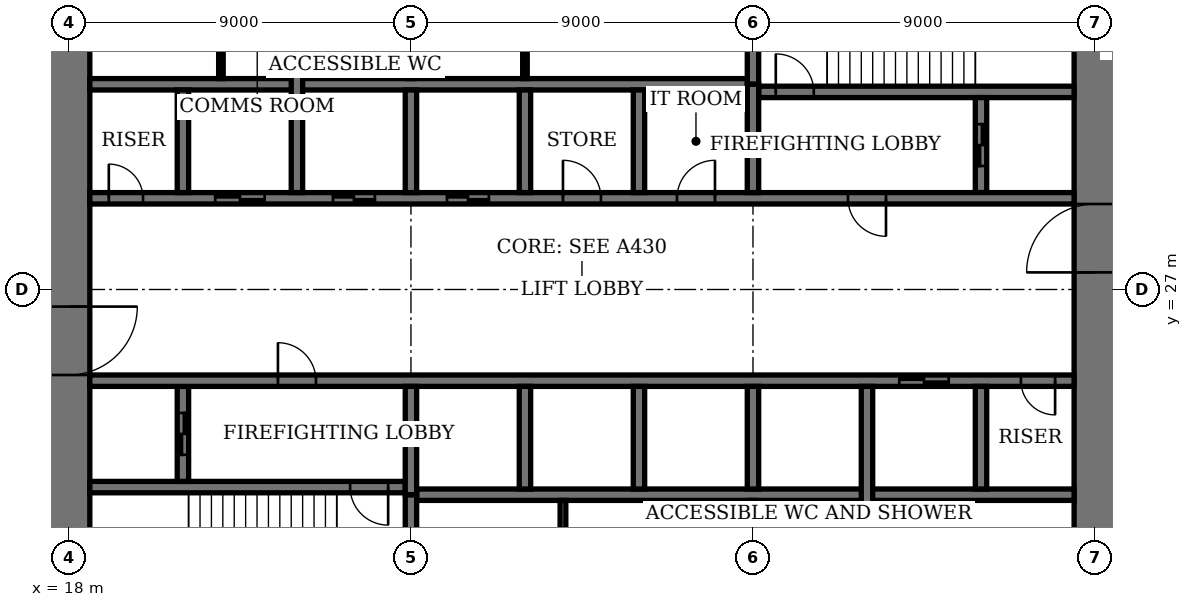
"""IFC4 building model, lengths in metres.
Left out: names, types, materials, properties, quantities, classifications, styles, units other than length and angle.
Written with IfcOpenShell. Run it as: python <this file> out.ifc"""

import sys

from ifc_helpers import new_model, si_unit, direction, frame, frame_2d, origin, place, context, subcontext, project, spatial, rectangle, extrude, element, fill, save


model = new_model("IFC4")
c1 = context("Model", 3, precision=1e-05, world=origin(), true_north=direction((0.0, 1.0)))
c2 = subcontext(c1, "Body", "Model", "MODEL_VIEW")
j1 = project(units=[si_unit("LENGTHUNIT", "METRE"), si_unit("PLANEANGLEUNIT", "RADIAN")], contexts=[c1])
p1 = place(None, origin())
s1 = spatial("IfcSite", under=j1, at=p1, CompositionType="ELEMENT")
p2 = place(p1, origin())
s2 = spatial("IfcBuilding", under=s1, at=p2, CompositionType="ELEMENT")
p3 = place(p2, frame((0.0, 0.0, 162.2)))
s3 = spatial("IfcBuildingStorey", under=s2, at=p3, CompositionType="ELEMENT", Elevation=162.2)
p4 = place(p3, frame((18.0, 35.45, 0.0), z_axis=(0.0, 0.0, 1.0), x_axis=(0.0, -1.0, 0.0)))
e1 = element("IfcWall", 1, at=p4, inside=s3, PredefinedType="SHEAR", context=c2, shape_type="SweptSolid", body=[
    extrude(rectangle(XDim=16.9, YDim=1.1, at=frame_2d((8.45, 0.0))), origin(), (0.0, 0.0, 1.0), 4.0),
])
p5 = place(p4, frame((8.9, 0.0, 0.0)))
e2 = element("IfcOpeningElement", 2, at=p5, cuts=e1, PredefinedType="OPENING", context=c2, shape_type="SweptSolid", body=[
    extrude(rectangle(XDim=1.8, YDim=2.4, at=frame_2d((0.9, 1.2))), frame((0.0, 0.56, 0.0), z_axis=(0.0, -1.0, 0.0), x_axis=(1.0, 0.0, 0.0)), (0.0, 0.0, 1.0), 1.12),
])
p6 = place(p3, frame((45.0, 18.55, 0.0), z_axis=(0.0, 0.0, 1.0), x_axis=(0.0, 1.0, 0.0)))
e3 = element("IfcWall", 3, at=p6, inside=s3, PredefinedType="SHEAR", context=c2, shape_type="SweptSolid", body=[
    extrude(rectangle(XDim=16.9, YDim=1.1, at=frame_2d((8.45, 0.0))), origin(), (0.0, 0.0, 1.0), 4.0),
])
p7 = place(p6, frame((8.9, 0.0, 0.0)))
e4 = element("IfcOpeningElement", 4, at=p7, cuts=e3, PredefinedType="OPENING", context=c2, shape_type="SweptSolid", body=[
    extrude(rectangle(XDim=1.8, YDim=2.4, at=frame_2d((0.9, 1.2))), frame((0.0, 0.56, 0.0), z_axis=(0.0, -1.0, 0.0), x_axis=(1.0, 0.0, 0.0)), (0.0, 0.0, 1.0), 1.12),
])
p8 = place(p3, frame((18.55, 21.8, 0.0), z_axis=(0.0, 0.0, 1.0), x_axis=(1.0, 0.0, 0.0)))
e5 = element("IfcWall", 5, at=p8, inside=s3, PredefinedType="SHEAR", context=c2, shape_type="SweptSolid", body=[
    extrude(rectangle(XDim=8.3, YDim=0.3, at=frame_2d((4.15, 0.0))), origin(), (0.0, 0.0, 1.0), 4.0),
])
p9 = place(p8, frame((6.85, 0.0, 0.0)))
e6 = element("IfcOpeningElement", 6, at=p9, cuts=e5, PredefinedType="OPENING", context=c2, shape_type="SweptSolid", body=[
    extrude(rectangle(XDim=1.0, YDim=2.4, at=frame_2d((0.5, 1.2))), frame((0.0, 0.16, 0.0), z_axis=(0.0, -1.0, 0.0), x_axis=(1.0, 0.0, 0.0)), (0.0, 0.0, 1.0), 0.32),
])
p10 = place(p3, frame((36.15, 32.2, 0.0), z_axis=(0.0, 0.0, 1.0), x_axis=(1.0, 0.0, 0.0)))
e7 = element("IfcWall", 7, at=p10, inside=s3, PredefinedType="SHEAR", context=c2, shape_type="SweptSolid", body=[
    extrude(rectangle(XDim=8.3, YDim=0.3, at=frame_2d((4.15, 0.0))), origin(), (0.0, 0.0, 1.0), 4.0),
])
p11 = place(p10, frame((0.45, 0.0, 0.0)))
e8 = element("IfcOpeningElement", 8, at=p11, cuts=e7, PredefinedType="OPENING", context=c2, shape_type="SweptSolid", body=[
    extrude(rectangle(XDim=1.0, YDim=2.4, at=frame_2d((0.5, 1.2))), frame((0.0, 0.16, 0.0), z_axis=(0.0, -1.0, 0.0), x_axis=(1.0, 0.0, 0.0)), (0.0, 0.0, 1.0), 0.32),
])
for number, where, z_axis, x_axis in (
    (9, (27.0, 18.55, 0.0), (0.0, 0.0, 1.0), (0.0, 1.0, 0.0)),
    (10, (36.0, 32.4, 0.0), (0.0, 0.0, 1.0), (0.0, 1.0, 0.0)),
):
    element("IfcWall", number, at=place(p3, frame(where, z_axis=z_axis, x_axis=x_axis)), inside=s3, PredefinedType="SHEAR", context=c2, shape_type="SweptSolid", body=[
        extrude(rectangle(XDim=3.05, YDim=0.3, at=frame_2d((1.525, 0.0))), origin(), (0.0, 0.0, 1.0), 4.0),
    ])
p12 = place(p3, frame((21.0, 21.95, 0.0), z_axis=(0.0, 0.0, 1.0), x_axis=(0.0, 1.0, 0.0)))
e11 = element("IfcWall", 11, at=p12, inside=s3, PredefinedType="SHEAR", context=c2, shape_type="SweptSolid", body=[
    extrude(rectangle(XDim=2.5, YDim=0.3, at=frame_2d((1.25, 0.0))), origin(), (0.0, 0.0, 1.0), 4.0),
])
p13 = place(p12, frame((0.7, 0.0, 0.0)))
e12 = element("IfcOpeningElement", 12, at=p13, cuts=e11, PredefinedType="OPENING", context=c2, shape_type="SweptSolid", body=[
    extrude(rectangle(XDim=1.1, YDim=2.4, at=frame_2d((0.55, 1.2))), frame((0.0, 0.16, 0.0), z_axis=(0.0, -1.0, 0.0), x_axis=(1.0, 0.0, 0.0)), (0.0, 0.0, 1.0), 0.32),
])
p14 = place(p3, frame((42.0, 29.55, 0.0), z_axis=(0.0, 0.0, 1.0), x_axis=(0.0, 1.0, 0.0)))
e13 = element("IfcWall", 13, at=p14, inside=s3, PredefinedType="SHEAR", context=c2, shape_type="SweptSolid", body=[
    extrude(rectangle(XDim=2.5, YDim=0.3, at=frame_2d((1.25, 0.0))), origin(), (0.0, 0.0, 1.0), 4.0),
])
p15 = place(p14, frame((0.7, 0.0, 0.0)))
e14 = element("IfcOpeningElement", 14, at=p15, cuts=e13, PredefinedType="OPENING", context=c2, shape_type="SweptSolid", body=[
    extrude(rectangle(XDim=1.1, YDim=2.4, at=frame_2d((0.55, 1.2))), frame((0.0, 0.16, 0.0), z_axis=(0.0, -1.0, 0.0), x_axis=(1.0, 0.0, 0.0)), (0.0, 0.0, 1.0), 0.32),
])
p16 = place(p3, frame((18.55, 24.6, 0.0), z_axis=(0.0, 0.0, 1.0), x_axis=(1.0, 0.0, 0.0)))
e15 = element("IfcWall", 15, at=p16, inside=s3, PredefinedType="SHEAR", context=c2, shape_type="SweptSolid", body=[
    extrude(rectangle(XDim=25.9, YDim=0.3, at=frame_2d((12.95, 0.0))), origin(), (0.0, 0.0, 1.0), 4.0),
])
p17 = place(p16, frame((4.95, 0.0, 0.0)))
e16 = element("IfcOpeningElement", 16, at=p17, cuts=e15, PredefinedType="OPENING", context=c2, shape_type="SweptSolid", body=[
    extrude(rectangle(XDim=1.0, YDim=2.4, at=frame_2d((0.5, 1.2))), frame((0.0, 0.16, 0.0), z_axis=(0.0, -1.0, 0.0), x_axis=(1.0, 0.0, 0.0)), (0.0, 0.0, 1.0), 0.32),
])
p18 = place(p16, frame((24.5, 0.0, 0.0)))
e17 = element("IfcOpeningElement", 17, at=p18, cuts=e15, PredefinedType="OPENING", context=c2, shape_type="SweptSolid", body=[
    extrude(rectangle(XDim=0.9, YDim=2.1, at=frame_2d((0.45, 1.05))), frame((0.0, 0.16, 0.0), z_axis=(0.0, -1.0, 0.0), x_axis=(1.0, 0.0, 0.0)), (0.0, 0.0, 1.0), 0.32),
])
p19 = place(p16, frame((21.3, 0.0, 0.0)))
e18 = element("IfcOpeningElement", 18, at=p19, cuts=e15, PredefinedType="OPENING", context=c2, shape_type="SweptSolid", body=[
    extrude(rectangle(XDim=1.3, YDim=2.4, at=frame_2d((0.65, 1.2))), frame((0.0, 0.16, 0.0), z_axis=(0.0, -1.0, 0.0), x_axis=(1.0, 0.0, 0.0)), (0.0, 0.0, 1.0), 0.32),
])
p20 = place(p3, frame((18.55, 29.4, 0.0), z_axis=(0.0, 0.0, 1.0), x_axis=(1.0, 0.0, 0.0)))
e19 = element("IfcWall", 19, at=p20, inside=s3, PredefinedType="SHEAR", context=c2, shape_type="SweptSolid", body=[
    extrude(rectangle(XDim=25.9, YDim=0.3, at=frame_2d((12.95, 0.0))), origin(), (0.0, 0.0, 1.0), 4.0),
])
p21 = place(p20, frame((19.95, 0.0, 0.0)))
e20 = element("IfcOpeningElement", 20, at=p21, cuts=e19, PredefinedType="OPENING", context=c2, shape_type="SweptSolid", body=[
    extrude(rectangle(XDim=1.0, YDim=2.4, at=frame_2d((0.5, 1.2))), frame((0.0, 0.16, 0.0), z_axis=(0.0, -1.0, 0.0), x_axis=(1.0, 0.0, 0.0)), (0.0, 0.0, 1.0), 0.32),
])
p22 = place(p20, frame((0.5, 0.0, 0.0)))
e21 = element("IfcOpeningElement", 21, at=p22, cuts=e19, PredefinedType="OPENING", context=c2, shape_type="SweptSolid", body=[
    extrude(rectangle(XDim=0.9, YDim=2.1, at=frame_2d((0.45, 1.05))), frame((0.0, 0.16, 0.0), z_axis=(0.0, -1.0, 0.0), x_axis=(1.0, 0.0, 0.0)), (0.0, 0.0, 1.0), 0.32),
])
p23 = place(p20, frame((15.45, 0.0, 0.0)))
e22 = element("IfcOpeningElement", 22, at=p23, cuts=e19, PredefinedType="OPENING", context=c2, shape_type="SweptSolid", body=[
    extrude(rectangle(XDim=1.0, YDim=2.4, at=frame_2d((0.5, 1.2))), frame((0.0, 0.16, 0.0), z_axis=(0.0, -1.0, 0.0), x_axis=(1.0, 0.0, 0.0)), (0.0, 0.0, 1.0), 0.32),
])
p24 = place(p20, frame((12.45, 0.0, 0.0)))
e23 = element("IfcOpeningElement", 23, at=p24, cuts=e19, PredefinedType="OPENING", context=c2, shape_type="SweptSolid", body=[
    extrude(rectangle(XDim=1.0, YDim=2.4, at=frame_2d((0.5, 1.2))), frame((0.0, 0.16, 0.0), z_axis=(0.0, -1.0, 0.0), x_axis=(1.0, 0.0, 0.0)), (0.0, 0.0, 1.0), 0.32),
])
p25 = place(p20, frame((9.4, 0.0, 0.0)))
e24 = element("IfcOpeningElement", 24, at=p25, cuts=e19, PredefinedType="OPENING", context=c2, shape_type="SweptSolid", body=[
    extrude(rectangle(XDim=1.1, YDim=2.4, at=frame_2d((0.55, 1.2))), frame((0.0, 0.16, 0.0), z_axis=(0.0, -1.0, 0.0), x_axis=(1.0, 0.0, 0.0)), (0.0, 0.0, 1.0), 0.32),
])
p26 = place(p20, frame((6.4, 0.0, 0.0)))
e25 = element("IfcOpeningElement", 25, at=p26, cuts=e19, PredefinedType="OPENING", context=c2, shape_type="SweptSolid", body=[
    extrude(rectangle(XDim=1.1, YDim=2.4, at=frame_2d((0.55, 1.2))), frame((0.0, 0.16, 0.0), z_axis=(0.0, -1.0, 0.0), x_axis=(1.0, 0.0, 0.0)), (0.0, 0.0, 1.0), 0.32),
])
p27 = place(p20, frame((3.3, 0.0, 0.0)))
e26 = element("IfcOpeningElement", 26, at=p27, cuts=e19, PredefinedType="OPENING", context=c2, shape_type="SweptSolid", body=[
    extrude(rectangle(XDim=1.3, YDim=2.4, at=frame_2d((0.65, 1.2))), frame((0.0, 0.16, 0.0), z_axis=(0.0, -1.0, 0.0), x_axis=(1.0, 0.0, 0.0)), (0.0, 0.0, 1.0), 0.32),
])
for number, where, z_axis, x_axis in (
    (27, (27.15, 21.6, 0.0), (0.0, 0.0, 1.0), (1.0, 0.0, 0.0)),
    (28, (18.55, 32.4, 0.0), (0.0, 0.0, 1.0), (1.0, 0.0, 0.0)),
):
    element("IfcWall", number, at=place(p3, frame(where, z_axis=z_axis, x_axis=x_axis)), inside=s3, PredefinedType="SHEAR", context=c2, shape_type="SweptSolid", body=[
        extrude(rectangle(XDim=17.3, YDim=0.3, at=frame_2d((8.65, 0.0))), origin(), (0.0, 0.0, 1.0), 4.0),
    ])
for number, where, z_axis, x_axis in (
    (29, (30.0, 21.75, 0.0), (0.0, 0.0, 1.0), (0.0, 1.0, 0.0)),
    (30, (33.0, 29.55, 0.0), (0.0, 0.0, 1.0), (0.0, 1.0, 0.0)),
    (31, (33.0, 21.75, 0.0), (0.0, 0.0, 1.0), (0.0, 1.0, 0.0)),
    (32, (30.0, 29.55, 0.0), (0.0, 0.0, 1.0), (0.0, 1.0, 0.0)),
    (33, (36.0, 21.75, 0.0), (0.0, 0.0, 1.0), (0.0, 1.0, 0.0)),
    (34, (27.0, 29.55, 0.0), (0.0, 0.0, 1.0), (0.0, 1.0, 0.0)),
):
    element("IfcWall", number, at=place(p3, frame(where, z_axis=z_axis, x_axis=x_axis)), inside=s3, PredefinedType="SHEAR", context=c2, shape_type="SweptSolid", body=[
        extrude(rectangle(XDim=2.7, YDim=0.3, at=frame_2d((1.35, 0.0))), origin(), (0.0, 0.0, 1.0), 4.0),
    ])
for number, where, z_axis, x_axis in (
    (35, (39.0, 18.55, 0.0), (0.0, 0.0, 1.0), (0.0, 1.0, 0.0)),
    (36, (24.0, 29.55, 0.0), (0.0, 0.0, 1.0), (0.0, 1.0, 0.0)),
):
    element("IfcWall", number, at=place(p3, frame(where, z_axis=z_axis, x_axis=x_axis)), inside=s3, PredefinedType="SHEAR", context=c2, shape_type="SweptSolid", body=[
        extrude(rectangle(XDim=5.9, YDim=0.3, at=frame_2d((2.95, 0.0))), origin(), (0.0, 0.0, 1.0), 4.0),
    ])
for number, where, z_axis, x_axis in (
    (37, (42.0, 21.75, 0.0), (0.0, 0.0, 1.0), (0.0, 1.0, 0.0)),
    (38, (21.0, 29.55, 0.0), (0.0, 0.0, 1.0), (0.0, 1.0, 0.0)),
):
    element("IfcWall", number, at=place(p3, frame(where, z_axis=z_axis, x_axis=x_axis)), inside=s3, PredefinedType="SHEAR", context=c2, shape_type="SweptSolid", body=[
        extrude(rectangle(XDim=2.7, YDim=0.3, at=frame_2d((1.35, 0.0))), origin(), (0.0, 0.0, 1.0), 4.0),
    ])
for number, where, z_axis, x_axis in (
    (39, (27.0, 21.6, 0.0), (0.0, 0.0, 1.0), (0.0, 1.0, 0.0)),
    (40, (36.0, 29.55, 0.0), (0.0, 0.0, 1.0), (0.0, 1.0, 0.0)),
):
    element("IfcWall", number, at=place(p3, frame(where, z_axis=z_axis, x_axis=x_axis)), inside=s3, PredefinedType="SHEAR", context=c2, shape_type="SweptSolid", body=[
        extrude(rectangle(XDim=2.85, YDim=0.3, at=frame_2d((1.425, 0.0))), origin(), (0.0, 0.0, 1.0), 4.0),
    ])
for number, where, z_axis, x_axis in (
    (41, (31.0, 18.55, 0.0), (0.0, 0.0, 1.0), (0.0, 1.0, 0.0)),
    (42, (36.0, 18.55, 0.0), (0.0, 0.0, 1.0), (0.0, 1.0, 0.0)),
):
    element("IfcWall", number, at=place(p3, frame(where, z_axis=z_axis, x_axis=x_axis)), inside=s3, PredefinedType="PARTITIONING", context=c2, shape_type="SweptSolid", body=[
        extrude(rectangle(XDim=2.9, YDim=0.15, at=frame_2d((1.45, 0.0))), origin(), (0.0, 0.0, 1.0), 3.75),
    ])
p28 = place(p3, frame((30.0, 32.55, 0.0), z_axis=(0.0, 0.0, 1.0), x_axis=(0.0, 1.0, 0.0)))
e43 = element("IfcWall", 43, at=p28, inside=s3, PredefinedType="PARTITIONING", context=c2, shape_type="SweptSolid", body=[
    extrude(rectangle(XDim=2.9, YDim=0.12, at=frame_2d((1.45, 0.0))), origin(), (0.0, 0.0, 1.0), 3.75),
])
p29 = place(p3, frame((27.0, 32.55, 0.0), z_axis=(0.0, 0.0, 1.0), x_axis=(0.0, 1.0, 0.0)))
e44 = element("IfcWall", 44, at=p29, inside=s3, PredefinedType="PARTITIONING", context=c2, shape_type="SweptSolid", body=[
    extrude(rectangle(XDim=2.9, YDim=0.15, at=frame_2d((1.45, 0.0))), origin(), (0.0, 0.0, 1.0), 3.75),
])
p30 = place(p3, frame((22.0, 32.55, 0.0), z_axis=(0.0, 0.0, 1.0), x_axis=(0.0, 1.0, 0.0)))
e45 = element("IfcWall", 45, at=p30, inside=s3, PredefinedType="PARTITIONING", context=c2, shape_type="SweptSolid", body=[
    extrude(rectangle(XDim=2.9, YDim=0.12, at=frame_2d((1.45, 0.0))), origin(), (0.0, 0.0, 1.0), 3.75),
])
p31 = place(p30, frame((0.95, 0.0, 0.0)))
e46 = element("IfcOpeningElement", 46, at=p31, cuts=e45, PredefinedType="OPENING", context=c2, shape_type="SweptSolid", body=[
    extrude(rectangle(XDim=1.0, YDim=2.4, at=frame_2d((0.5, 1.2))), frame((0.0, 0.07, 0.0), z_axis=(0.0, -1.0, 0.0), x_axis=(1.0, 0.0, 0.0)), (0.0, 0.0, 1.0), 0.14),
])
p32 = place(p5, origin())
e47 = element("IfcDoor", 47, at=p32, inside=s3, OperationType="DOUBLE_DOOR_DOUBLE_SWING", PredefinedType="DOOR", context=c2, shape_type="SweptSolid", body=[
    extrude(rectangle(XDim=1.8, YDim=2.4, at=frame_2d((0.9, 1.2))), frame((0.0, 0.03, 0.0), z_axis=(0.0, -1.0, 0.0), x_axis=(1.0, 0.0, 0.0)), (0.0, 0.0, 1.0), 0.06),
    extrude(rectangle(XDim=0.04, YDim=2.4, at=frame_2d((0.02, 1.2))), frame((0.0, 0.55, 0.0), z_axis=(0.0, -1.0, 0.0), x_axis=(1.0, 0.0, 0.0)), (0.0, 0.0, 1.0), 1.1),
    extrude(rectangle(XDim=0.04, YDim=2.4, at=frame_2d((1.78, 1.2))), frame((0.0, 0.55, 0.0), z_axis=(0.0, -1.0, 0.0), x_axis=(1.0, 0.0, 0.0)), (0.0, 0.0, 1.0), 1.1),
    extrude(rectangle(XDim=1.8, YDim=0.04, at=frame_2d((0.9, 2.38))), frame((0.0, 0.55, 0.0), z_axis=(0.0, -1.0, 0.0), x_axis=(1.0, 0.0, 0.0)), (0.0, 0.0, 1.0), 1.1),
])
fill(e2, e47)
p33 = place(p7, origin())
e48 = element("IfcDoor", 48, at=p33, inside=s3, OperationType="DOUBLE_DOOR_DOUBLE_SWING", PredefinedType="DOOR", context=c2, shape_type="SweptSolid", body=[
    extrude(rectangle(XDim=1.8, YDim=2.4, at=frame_2d((0.9, 1.2))), frame((0.0, 0.03, 0.0), z_axis=(0.0, -1.0, 0.0), x_axis=(1.0, 0.0, 0.0)), (0.0, 0.0, 1.0), 0.06),
    extrude(rectangle(XDim=0.04, YDim=2.4, at=frame_2d((0.02, 1.2))), frame((0.0, 0.55, 0.0), z_axis=(0.0, -1.0, 0.0), x_axis=(1.0, 0.0, 0.0)), (0.0, 0.0, 1.0), 1.1),
    extrude(rectangle(XDim=0.04, YDim=2.4, at=frame_2d((1.78, 1.2))), frame((0.0, 0.55, 0.0), z_axis=(0.0, -1.0, 0.0), x_axis=(1.0, 0.0, 0.0)), (0.0, 0.0, 1.0), 1.1),
    extrude(rectangle(XDim=1.8, YDim=0.04, at=frame_2d((0.9, 2.38))), frame((0.0, 0.55, 0.0), z_axis=(0.0, -1.0, 0.0), x_axis=(1.0, 0.0, 0.0)), (0.0, 0.0, 1.0), 1.1),
])
fill(e4, e48)
p34 = place(p9, origin())
e49 = element("IfcDoor", 49, at=p34, inside=s3, OperationType="SINGLE_SWING_RIGHT", PredefinedType="DOOR", context=c2, shape_type="SweptSolid", body=[
    extrude(rectangle(XDim=1.0, YDim=2.4, at=frame_2d((0.5, 1.2))), frame((0.0, 0.03, 0.0), z_axis=(0.0, -1.0, 0.0), x_axis=(1.0, 0.0, 0.0)), (0.0, 0.0, 1.0), 0.06),
])
fill(e6, e49)
p35 = place(p11, origin())
e50 = element("IfcDoor", 50, at=p35, inside=s3, OperationType="SINGLE_SWING_RIGHT", PredefinedType="DOOR", context=c2, shape_type="SweptSolid", body=[
    extrude(rectangle(XDim=1.0, YDim=2.4, at=frame_2d((0.5, 1.2))), frame((0.0, 0.03, 0.0), z_axis=(0.0, -1.0, 0.0), x_axis=(1.0, 0.0, 0.0)), (0.0, 0.0, 1.0), 0.06),
])
fill(e8, e50)
p36 = place(p17, origin())
e51 = element("IfcDoor", 51, at=p36, inside=s3, OperationType="SINGLE_SWING_RIGHT", PredefinedType="DOOR", context=c2, shape_type="SweptSolid", body=[
    extrude(rectangle(XDim=1.0, YDim=2.4, at=frame_2d((0.5, 1.2))), frame((0.0, 0.03, 0.0), z_axis=(0.0, -1.0, 0.0), x_axis=(1.0, 0.0, 0.0)), (0.0, 0.0, 1.0), 0.06),
])
fill(e16, e51)
p37 = place(p21, origin())
e52 = element("IfcDoor", 52, at=p37, inside=s3, OperationType="SINGLE_SWING_RIGHT", PredefinedType="DOOR", context=c2, shape_type="SweptSolid", body=[
    extrude(rectangle(XDim=1.0, YDim=2.4, at=frame_2d((0.5, 1.2))), frame((0.0, 0.03, 0.0), z_axis=(0.0, -1.0, 0.0), x_axis=(1.0, 0.0, 0.0)), (0.0, 0.0, 1.0), 0.06),
])
fill(e20, e52)
p38 = place(p18, origin())
e53 = element("IfcDoor", 53, at=p38, inside=s3, OperationType="SINGLE_SWING_RIGHT", PredefinedType="DOOR", context=c2, shape_type="SweptSolid", body=[
    extrude(rectangle(XDim=0.9, YDim=2.1, at=frame_2d((0.45, 1.05))), frame((0.0, 0.03, 0.0), z_axis=(0.0, -1.0, 0.0), x_axis=(1.0, 0.0, 0.0)), (0.0, 0.0, 1.0), 0.06),
])
fill(e17, e53)
p39 = place(p22, origin())
e54 = element("IfcDoor", 54, at=p39, inside=s3, OperationType="SINGLE_SWING_RIGHT", PredefinedType="DOOR", context=c2, shape_type="SweptSolid", body=[
    extrude(rectangle(XDim=0.9, YDim=2.1, at=frame_2d((0.45, 1.05))), frame((0.0, 0.03, 0.0), z_axis=(0.0, -1.0, 0.0), x_axis=(1.0, 0.0, 0.0)), (0.0, 0.0, 1.0), 0.06),
])
fill(e21, e54)
p40 = place(p23, origin())
e55 = element("IfcDoor", 55, at=p40, inside=s3, OperationType="SINGLE_SWING_LEFT", PredefinedType="DOOR", context=c2, shape_type="SweptSolid", body=[
    extrude(rectangle(XDim=1.0, YDim=2.4, at=frame_2d((0.5, 1.2))), frame((0.0, 0.03, 0.0), z_axis=(0.0, -1.0, 0.0), x_axis=(1.0, 0.0, 0.0)), (0.0, 0.0, 1.0), 0.06),
])
fill(e22, e55)
p41 = place(p24, origin())
e56 = element("IfcDoor", 56, at=p41, inside=s3, OperationType="SINGLE_SWING_RIGHT", PredefinedType="DOOR", context=c2, shape_type="SweptSolid", body=[
    extrude(rectangle(XDim=1.0, YDim=2.4, at=frame_2d((0.5, 1.2))), frame((0.0, 0.03, 0.0), z_axis=(0.0, -1.0, 0.0), x_axis=(1.0, 0.0, 0.0)), (0.0, 0.0, 1.0), 0.06),
])
fill(e23, e56)
p42 = place(p25, origin())
e57 = element("IfcDoor", 57, at=p42, inside=s3, OperationType="DOUBLE_DOOR_SLIDING", PredefinedType="DOOR", context=c2, shape_type="SweptSolid", body=[
    extrude(rectangle(XDim=1.1, YDim=2.4, at=frame_2d((0.55, 1.2))), frame((0.0, 0.02, 0.0), z_axis=(0.0, -1.0, 0.0), x_axis=(1.0, 0.0, 0.0)), (0.0, 0.0, 1.0), 0.04),
])
fill(e24, e57)
p43 = place(p26, origin())
e58 = element("IfcDoor", 58, at=p43, inside=s3, OperationType="DOUBLE_DOOR_SLIDING", PredefinedType="DOOR", context=c2, shape_type="SweptSolid", body=[
    extrude(rectangle(XDim=1.1, YDim=2.4, at=frame_2d((0.55, 1.2))), frame((0.0, 0.02, 0.0), z_axis=(0.0, -1.0, 0.0), x_axis=(1.0, 0.0, 0.0)), (0.0, 0.0, 1.0), 0.04),
])
fill(e25, e58)
p44 = place(p19, origin())
e59 = element("IfcDoor", 59, at=p44, inside=s3, OperationType="DOUBLE_DOOR_SLIDING", PredefinedType="DOOR", context=c2, shape_type="SweptSolid", body=[
    extrude(rectangle(XDim=1.3, YDim=2.4, at=frame_2d((0.65, 1.2))), frame((0.0, 0.02, 0.0), z_axis=(0.0, -1.0, 0.0), x_axis=(1.0, 0.0, 0.0)), (0.0, 0.0, 1.0), 0.04),
])
fill(e18, e59)
p45 = place(p27, origin())
e60 = element("IfcDoor", 60, at=p45, inside=s3, OperationType="DOUBLE_DOOR_SLIDING", PredefinedType="DOOR", context=c2, shape_type="SweptSolid", body=[
    extrude(rectangle(XDim=1.3, YDim=2.4, at=frame_2d((0.65, 1.2))), frame((0.0, 0.02, 0.0), z_axis=(0.0, -1.0, 0.0), x_axis=(1.0, 0.0, 0.0)), (0.0, 0.0, 1.0), 0.04),
])
fill(e26, e60)
p46 = place(p13, origin())
e61 = element("IfcDoor", 61, at=p46, inside=s3, OperationType="DOUBLE_DOOR_SLIDING", PredefinedType="DOOR", context=c2, shape_type="SweptSolid", body=[
    extrude(rectangle(XDim=1.1, YDim=2.4, at=frame_2d((0.55, 1.2))), frame((0.0, 0.03, 0.0), z_axis=(0.0, -1.0, 0.0), x_axis=(1.0, 0.0, 0.0)), (0.0, 0.0, 1.0), 0.06),
])
fill(e12, e61)
p47 = place(p15, origin())
e62 = element("IfcDoor", 62, at=p47, inside=s3, OperationType="DOUBLE_DOOR_SLIDING", PredefinedType="DOOR", context=c2, shape_type="SweptSolid", body=[
    extrude(rectangle(XDim=1.1, YDim=2.4, at=frame_2d((0.55, 1.2))), frame((0.0, 0.03, 0.0), z_axis=(0.0, -1.0, 0.0), x_axis=(1.0, 0.0, 0.0)), (0.0, 0.0, 1.0), 0.06),
])
fill(e14, e62)
save(model, sys.argv[1])
